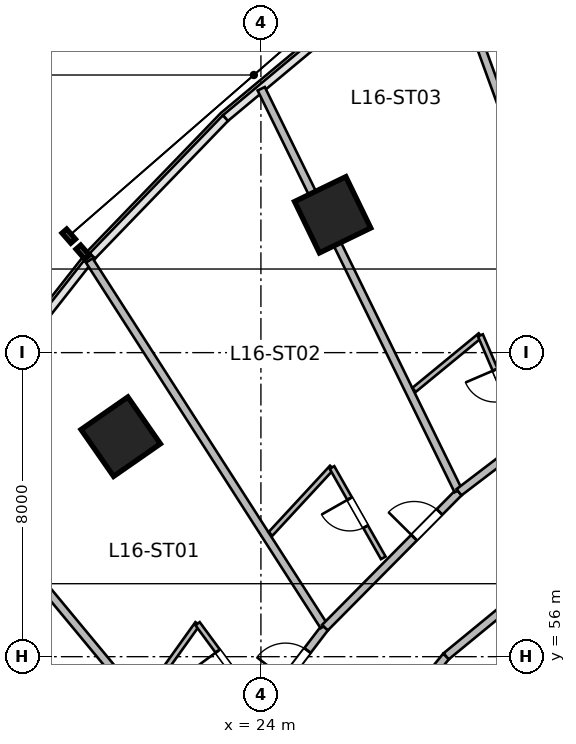
"""IFC4 building model, lengths in metres.
Left out: names, types, materials, properties, quantities, classifications, styles, units other than length and angle.
Written with IfcOpenShell. Run it as: python <this file> out.ifc"""

import sys

from ifc_helpers import new_model, si_unit, direction, frame, frame_2d, origin, origin_2d, place, context, subcontext, project, spatial, rectangle, extrude, source, transform, mapped, element, fill, save


model = new_model("IFC4")
c1 = context("Model", 3, precision=1e-05, world=origin(), true_north=direction((0.0, 1.0)))
c2 = subcontext(c1, "Body", "Model", "MODEL_VIEW")
j1 = project(units=[si_unit("LENGTHUNIT", "METRE"), si_unit("PLANEANGLEUNIT", "RADIAN")], contexts=[c1])
p1 = place(None, origin())
s1 = spatial("IfcSite", under=j1, at=p1, CompositionType="ELEMENT")
p2 = place(p1, origin())
s2 = spatial("IfcBuilding", under=s1, at=p2, CompositionType="ELEMENT")
p3 = place(p2, frame((0.0, 0.0, 71.4)))
s3 = spatial("IfcBuildingStorey", under=s2, at=p3, CompositionType="ELEMENT", Elevation=71.4)
m1 = source(origin(), c2, "Body", "SweptSolid", [
    extrude(rectangle(XDim=1.5, YDim=1.5, at=origin_2d()), origin(), (0.0, 0.0, 1.0), 3.6),
])
for number, where, z_axis, x_axis in (
    (1, (20.311, 61.789, 0.0), (0.0, 0.0, 1.0), (-0.571, 0.821, 0.0)),
    (2, (25.888, 67.627, 0.0), (0.0, 0.0, 1.0), (-0.436, 0.9, 0.0)),
):
    element("IfcColumn", number, at=place(p3, frame(where, z_axis=z_axis, x_axis=x_axis)), inside=s3, PredefinedType="COLUMN", context=c2, shape_type="MappedRepresentation", body=[
        mapped(m1, transform((0.0, 0.0, 0.0), scale=1.0)),
    ])
m2 = source(origin(), c2, "Body", "SweptSolid", [
    extrude(rectangle(XDim=7.113, YDim=0.21, at=frame_2d((3.556, 0.0))), origin(), (0.0, 0.0, 1.0), 3.36),
])
p4 = place(p3, frame((24.383, 50.495, 0.0), z_axis=(0.0, 0.0, 1.0), x_axis=(0.63149032532, 0.775383755974, 0.0)))
e3 = element("IfcWall", 3, at=p4, inside=s3, PredefinedType="PARTITIONING", context=c2, shape_type="MappedRepresentation", body=[
    mapped(m2, transform((0.0, 0.0, 0.0), scale=1.0)),
])
p5 = place(p4, frame((2.856, 0.0, 0.0)))
e4 = element("IfcOpeningElement", 4, at=p5, cuts=e3, PredefinedType="OPENING", context=c2, shape_type="SweptSolid", body=[
    extrude(rectangle(XDim=1.4, YDim=2.15, at=frame_2d((0.7, 1.075))), frame((0.0, 0.115, 0.0), z_axis=(0.0, -1.0, 0.0), x_axis=(1.0, 0.0, 0.0)), (0.0, 0.0, 1.0), 0.23),
])
m3 = source(origin(), c2, "Body", "SweptSolid", [
    extrude(rectangle(XDim=6.721, YDim=0.21, at=frame_2d((3.361, 0.0))), origin(), (0.0, 0.0, 1.0), 3.36),
])
p6 = place(p3, frame((28.874, 56.01, 0.0), z_axis=(0.0, 0.0, 1.0), x_axis=(0.772828051199, 0.63461547671, 0.0)))
e5 = element("IfcWall", 5, at=p6, inside=s3, PredefinedType="PARTITIONING", context=c2, shape_type="MappedRepresentation", body=[
    mapped(m3, transform((0.0, 0.0, 0.0), scale=1.0)),
])
m4 = source(origin(), c2, "Body", "SweptSolid", [
    extrude(rectangle(XDim=5.135, YDim=0.21, at=frame_2d((2.567, 0.0))), origin(), (0.0, 0.0, 1.0), 3.36),
])
p7 = place(p3, frame((22.57, 52.683, 0.0), z_axis=(0.0, 0.0, 1.0), x_axis=(0.606802199649, 0.794852873494, 0.0)))
e6 = element("IfcWall", 6, at=p7, inside=s3, PredefinedType="PARTITIONING", context=c2, shape_type="MappedRepresentation", body=[
    mapped(m4, transform((0.0, 0.0, 0.0), scale=1.0)),
])
p8 = place(p7, frame((3.427, 0.0, 0.0)))
e7 = element("IfcOpeningElement", 7, at=p8, cuts=e6, PredefinedType="OPENING", context=c2, shape_type="SweptSolid", body=[
    extrude(rectangle(XDim=0.95, YDim=2.15, at=frame_2d((0.475, 1.075))), frame((0.0, 0.115, 0.0), z_axis=(0.0, -1.0, 0.0), x_axis=(1.0, 0.0, 0.0)), (0.0, 0.0, 1.0), 0.23),
])
m5 = source(origin(), c2, "Body", "SweptSolid", [
    extrude(rectangle(XDim=10.975, YDim=0.21, at=frame_2d((5.487, 0.0))), origin(), (0.0, 0.0, 1.0), 3.36),
])
p9 = place(p3, frame((22.54, 52.719, 0.0), z_axis=(0.0, 0.0, 1.0), x_axis=(-0.638125265812, 0.769932558821, 0.0)))
e8 = element("IfcWall", 8, at=p9, inside=s3, PredefinedType="PARTITIONING", context=c2, shape_type="MappedRepresentation", body=[
    mapped(m5, transform((0.0, 0.0, 0.0), scale=1.0)),
])
m6 = source(origin(), c2, "Body", "SweptSolid", [
    extrude(rectangle(XDim=11.432, YDim=0.21, at=frame_2d((5.716, 0.0))), origin(), (0.0, 0.0, 1.0), 3.36),
])
p10 = place(p3, frame((25.659, 56.805, 0.0), z_axis=(0.0, 0.0, 1.0), x_axis=(-0.540196183124, 0.841539115988, 0.0)))
e9 = element("IfcWall", 9, at=p10, inside=s3, PredefinedType="PARTITIONING", context=c2, shape_type="MappedRepresentation", body=[
    mapped(m6, transform((0.0, 0.0, 0.0), scale=1.0)),
])
m7 = source(origin(), c2, "Body", "SweptSolid", [
    extrude(rectangle(XDim=2.437, YDim=0.14, at=frame_2d((1.218, 0.0))), origin(), (0.0, 0.0, 1.0), 3.36),
])
p11 = place(p3, frame((20.915, 54.886, 0.0), z_axis=(0.0, 0.0, 1.0), x_axis=(0.581797219134, 0.813333877204, 0.0)))
e10 = element("IfcWall", 10, at=p11, inside=s3, PredefinedType="PARTITIONING", context=c2, shape_type="MappedRepresentation", body=[
    mapped(m7, transform((0.0, 0.0, 0.0), scale=1.0)),
])
m8 = source(origin(), c2, "Body", "SweptSolid", [
    extrude(rectangle(XDim=2.642, YDim=0.14, at=frame_2d((1.321, 0.0))), origin(), (0.0, 0.0, 1.0), 3.36),
])
p12 = place(p3, frame((23.899, 54.741, 0.0), z_axis=(0.0, 0.0, 1.0), x_axis=(-0.592789122423, 0.805357719487, 0.0)))
e11 = element("IfcWall", 11, at=p12, inside=s3, PredefinedType="PARTITIONING", context=c2, shape_type="MappedRepresentation", body=[
    mapped(m8, transform((0.0, 0.0, 0.0), scale=1.0)),
])
p13 = place(p12, frame((0.896, 0.0, 0.0)))
e12 = element("IfcOpeningElement", 12, at=p13, cuts=e11, PredefinedType="OPENING", context=c2, shape_type="SweptSolid", body=[
    extrude(rectangle(XDim=0.85, YDim=2.05, at=frame_2d((0.425, 1.025))), frame((0.0, 0.08, 0.0), z_axis=(0.0, -1.0, 0.0), x_axis=(1.0, 0.0, 0.0)), (0.0, 0.0, 1.0), 0.16),
])
m9 = source(origin(), c2, "Body", "SweptSolid", [
    extrude(rectangle(XDim=5.012, YDim=0.21, at=frame_2d((2.506, 0.0))), origin(), (0.0, 0.0, 1.0), 3.36),
])
p14 = place(p3, frame((25.685, 56.764, 0.0), z_axis=(0.0, 0.0, 1.0), x_axis=(0.703664626435, 0.710532260707, 0.0)))
e13 = element("IfcWall", 13, at=p14, inside=s3, PredefinedType="PARTITIONING", context=c2, shape_type="MappedRepresentation", body=[
    mapped(m9, transform((0.0, 0.0, 0.0), scale=1.0)),
])
p15 = place(p14, frame((3.335, 0.0, 0.0)))
e14 = element("IfcOpeningElement", 14, at=p15, cuts=e13, PredefinedType="OPENING", context=c2, shape_type="SweptSolid", body=[
    extrude(rectangle(XDim=0.95, YDim=2.15, at=frame_2d((0.475, 1.075))), frame((0.0, 0.115, 0.0), z_axis=(0.0, -1.0, 0.0), x_axis=(1.0, 0.0, 0.0)), (0.0, 0.0, 1.0), 0.23),
])
m10 = source(origin(), c2, "Body", "SweptSolid", [
    extrude(rectangle(XDim=11.775, YDim=0.21, at=frame_2d((5.887, 0.0))), origin(), (0.0, 0.0, 1.0), 2.644),
])
p16 = place(p3, frame((29.19, 60.371, 0.0), z_axis=(0.0, 0.0, 1.0), x_axis=(-0.4401500056, 0.897924257702, 0.0)))
e15 = element("IfcWall", 15, at=p16, inside=s3, PredefinedType="PARTITIONING", context=c2, shape_type="MappedRepresentation", body=[
    mapped(m10, transform((0.0, 0.0, 0.0), scale=1.0)),
])
m11 = source(origin(), c2, "Body", "SweptSolid", [
    extrude(rectangle(XDim=2.38, YDim=0.14, at=frame_2d((1.19, 0.0))), origin(), (0.0, 0.0, 1.0), 3.36),
])
p17 = place(p3, frame((24.253, 59.231, 0.0), z_axis=(0.0, 0.0, 1.0), x_axis=(0.679084816758, 0.734059814762, 0.0)))
e16 = element("IfcWall", 16, at=p17, inside=s3, PredefinedType="PARTITIONING", context=c2, shape_type="MappedRepresentation", body=[
    mapped(m11, transform((0.0, 0.0, 0.0), scale=1.0)),
])
m12 = source(origin(), c2, "Body", "SweptSolid", [
    extrude(rectangle(XDim=2.735, YDim=0.14, at=frame_2d((1.367, 0.0))), origin(), (0.0, 0.0, 1.0), 3.36),
])
p18 = place(p3, frame((27.219, 58.6, 0.0), z_axis=(0.0, 0.0, 1.0), x_axis=(-0.493694940578, 0.869635156631, 0.0)))
e17 = element("IfcWall", 17, at=p18, inside=s3, PredefinedType="PARTITIONING", context=c2, shape_type="MappedRepresentation", body=[
    mapped(m12, transform((0.0, 0.0, 0.0), scale=1.0)),
])
p19 = place(p18, frame((0.942, 0.0, 0.0)))
e18 = element("IfcOpeningElement", 18, at=p19, cuts=e17, PredefinedType="OPENING", context=c2, shape_type="SweptSolid", body=[
    extrude(rectangle(XDim=0.85, YDim=2.05, at=frame_2d((0.425, 1.025))), frame((0.0, 0.08, 0.0), z_axis=(0.0, -1.0, 0.0), x_axis=(1.0, 0.0, 0.0)), (0.0, 0.0, 1.0), 0.16),
])
m13 = source(origin(), c2, "Body", "SweptSolid", [
    extrude(rectangle(XDim=4.762, YDim=0.21, at=frame_2d((2.381, 0.0))), origin(), (0.0, 0.0, 1.0), 3.36),
])
p20 = place(p3, frame((29.212, 60.326, 0.0), z_axis=(0.0, 0.0, 1.0), x_axis=(0.795070295872, 0.60651729128, 0.0)))
e19 = element("IfcWall", 19, at=p20, inside=s3, PredefinedType="PARTITIONING", context=c2, shape_type="MappedRepresentation", body=[
    mapped(m13, transform((0.0, 0.0, 0.0), scale=1.0)),
])
p21 = place(p20, frame((3.144, 0.0, 0.0)))
e20 = element("IfcOpeningElement", 20, at=p21, cuts=e19, PredefinedType="OPENING", context=c2, shape_type="SweptSolid", body=[
    extrude(rectangle(XDim=0.95, YDim=2.15, at=frame_2d((0.475, 1.075))), frame((0.0, 0.115, 0.0), z_axis=(0.0, -1.0, 0.0), x_axis=(1.0, 0.0, 0.0)), (0.0, 0.0, 1.0), 0.23),
])
m14 = source(origin(), c2, "Body", "SweptSolid", [
    extrude(rectangle(XDim=12.088, YDim=0.21, at=frame_2d((6.044, 0.0))), origin(), (0.0, 0.0, 1.0), 3.36),
])
p22 = place(p3, frame((32.981, 63.262, 0.0), z_axis=(0.0, 0.0, 1.0), x_axis=(-0.34203007529, 0.939689005787, 0.0)))
e21 = element("IfcWall", 21, at=p22, inside=s3, PredefinedType="PARTITIONING", context=c2, shape_type="MappedRepresentation", body=[
    mapped(m14, transform((0.0, 0.0, 0.0), scale=1.0)),
])
m15 = source(origin(), c2, "Body", "SweptSolid", [
    extrude(rectangle(XDim=2.26, YDim=0.14, at=frame_2d((1.13, 0.0))), origin(), (0.0, 0.0, 1.0), 3.36),
])
p23 = place(p3, frame((28.029, 63.02, 0.0), z_axis=(0.0, 0.0, 1.0), x_axis=(0.772646789219, 0.634836151388, 0.0)))
e22 = element("IfcWall", 22, at=p23, inside=s3, PredefinedType="PARTITIONING", context=c2, shape_type="MappedRepresentation", body=[
    mapped(m15, transform((0.0, 0.0, 0.0), scale=1.0)),
])
m16 = source(origin(), c2, "Body", "SweptSolid", [
    extrude(rectangle(XDim=2.819, YDim=0.14, at=frame_2d((1.409, 0.0))), origin(), (0.0, 0.0, 1.0), 3.36),
])
p24 = place(p3, frame((30.888, 61.864, 0.0), z_axis=(0.0, 0.0, 1.0), x_axis=(-0.394420979357, 0.918929861874, 0.0)))
e23 = element("IfcWall", 23, at=p24, inside=s3, PredefinedType="PARTITIONING", context=c2, shape_type="MappedRepresentation", body=[
    mapped(m16, transform((0.0, 0.0, 0.0), scale=1.0)),
])
p25 = place(p24, frame((0.984, 0.0, 0.0)))
e24 = element("IfcOpeningElement", 24, at=p25, cuts=e23, PredefinedType="OPENING", context=c2, shape_type="SweptSolid", body=[
    extrude(rectangle(XDim=0.85, YDim=2.05, at=frame_2d((0.425, 1.025))), frame((0.0, 0.08, 0.0), z_axis=(0.0, -1.0, 0.0), x_axis=(1.0, 0.0, 0.0)), (0.0, 0.0, 1.0), 0.16),
])
m17 = source(origin(), c2, "Body", "SweptSolid", [
    extrude(rectangle(XDim=0.95, YDim=2.15, at=frame_2d((0.475, 1.075))), frame((0.0, 0.025, 0.0), z_axis=(0.0, -1.0, 0.0), x_axis=(1.0, 0.0, 0.0)), (0.0, 0.0, 1.0), 0.05),
])
p26 = place(p8, origin())
e25 = element("IfcDoor", 25, at=p26, inside=s3, OperationType="SINGLE_SWING_LEFT", PredefinedType="DOOR", context=c2, shape_type="MappedRepresentation", body=[
    mapped(m17, transform((0.0, 0.0, 0.0), scale=1.0)),
])
fill(e7, e25)
m18 = source(origin(), c2, "Body", "SweptSolid", [
    extrude(rectangle(XDim=0.85, YDim=2.05, at=frame_2d((0.425, 1.025))), frame((0.0, 0.025, 0.0), z_axis=(0.0, -1.0, 0.0), x_axis=(1.0, 0.0, 0.0)), (0.0, 0.0, 1.0), 0.05),
])
p27 = place(p13, origin())
e26 = element("IfcDoor", 26, at=p27, inside=s3, OperationType="SINGLE_SWING_RIGHT", PredefinedType="DOOR", context=c2, shape_type="MappedRepresentation", body=[
    mapped(m18, transform((0.0, 0.0, 0.0), scale=1.0)),
])
fill(e12, e26)
p28 = place(p15, origin())
e27 = element("IfcDoor", 27, at=p28, inside=s3, OperationType="SINGLE_SWING_LEFT", PredefinedType="DOOR", context=c2, shape_type="MappedRepresentation", body=[
    mapped(m17, transform((0.0, 0.0, 0.0), scale=1.0)),
])
fill(e14, e27)
p29 = place(p19, origin())
e28 = element("IfcDoor", 28, at=p29, inside=s3, OperationType="SINGLE_SWING_RIGHT", PredefinedType="DOOR", context=c2, shape_type="MappedRepresentation", body=[
    mapped(m18, transform((0.0, 0.0, 0.0), scale=1.0)),
])
fill(e18, e28)
p30 = place(p25, origin())
e29 = element("IfcDoor", 29, at=p30, inside=s3, OperationType="SINGLE_SWING_RIGHT", PredefinedType="DOOR", context=c2, shape_type="MappedRepresentation", body=[
    mapped(m18, transform((0.0, 0.0, 0.0), scale=1.0)),
])
fill(e24, e29)
save(model, sys.argv[1])
